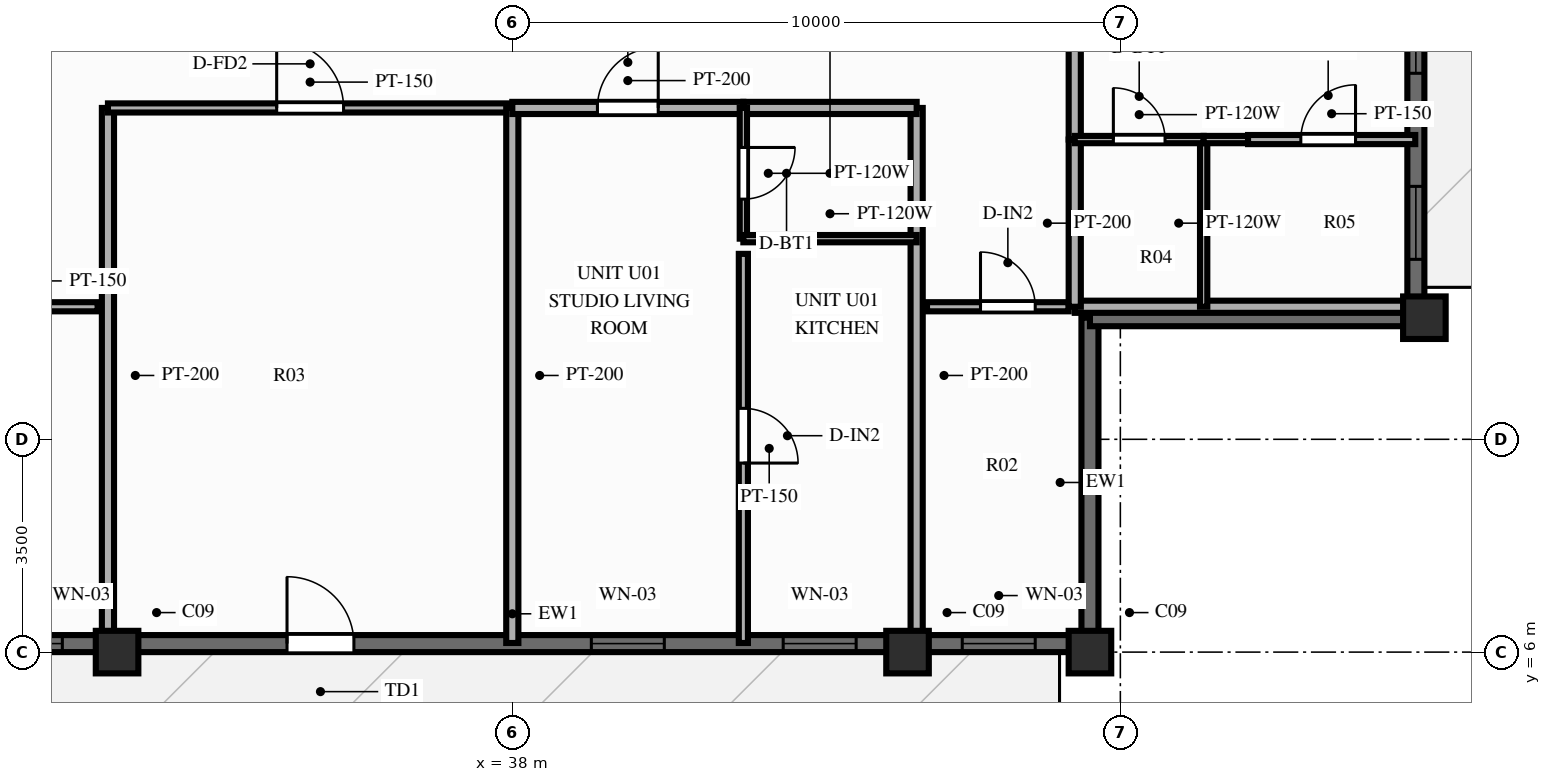
"""IFC4 building model, lengths in metres.
Left out: names, types, materials, properties, quantities, classifications, styles, units other than length and angle.
Written with IfcOpenShell. Run it as: python <this file> out.ifc"""

import sys

from ifc_helpers import new_model, si_unit, direction, frame, frame_2d, origin, origin_2d, place, context, subcontext, project, spatial, rectangle, extrude, source, transform, mapped, element, fill, save


model = new_model("IFC4")
c1 = context("Model", 3, precision=1e-05, world=origin(), true_north=direction((0.0, 1.0)))
c2 = subcontext(c1, "Body", "Model", "MODEL_VIEW")
j1 = project(units=[si_unit("LENGTHUNIT", "METRE"), si_unit("PLANEANGLEUNIT", "RADIAN")], contexts=[c1])
p1 = place(None, origin())
s1 = spatial("IfcSite", under=j1, at=p1, CompositionType="ELEMENT")
p2 = place(p1, origin())
s2 = spatial("IfcBuilding", under=s1, at=p2, CompositionType="ELEMENT")
p3 = place(p2, frame((0.0, 0.0, 243.0)))
s3 = spatial("IfcBuildingStorey", under=s2, at=p3, CompositionType="ELEMENT", Elevation=243.0)
m1 = source(origin(), c2, "Body", "SweptSolid", [
    extrude(rectangle(XDim=0.7, YDim=0.7, at=origin_2d()), origin(), (0.0, 0.0, 1.0), 3.0),
])
for number, where, z_axis, x_axis in (
    (1, (31.5, 6.0, 0.0), (0.0, 0.0, 1.0), (1.0, 0.0, 0.0)),
    (2, (44.5, 6.0, 0.0), (0.0, 0.0, 1.0), (1.0, 0.0, 0.0)),
    (3, (47.5, 6.0, 0.0), (0.0, 0.0, 1.0), (1.0, 0.0, 0.0)),
    (4, (53.0, 11.5, 0.0), (0.0, 0.0, 1.0), (1.0, 0.0, 0.0)),
):
    element("IfcColumn", number, at=place(p3, frame(where, z_axis=z_axis, x_axis=x_axis)), inside=s3, PredefinedType="COLUMN", context=c2, shape_type="MappedRepresentation", body=[
        mapped(m1, transform((0.0, 0.0, 0.0), scale=1.0)),
    ])
p4 = place(p3, frame((28.5, 6.14, 0.0), z_axis=(0.0, 0.0, 1.0), x_axis=(1.0, 0.0, 0.0)))
e5 = element("IfcWall", 5, at=p4, inside=s3, PredefinedType="SOLIDWALL", context=c2, shape_type="SweptSolid", body=[
    extrude(rectangle(XDim=19.0, YDim=0.28, at=frame_2d((9.5, 0.0))), origin(), (0.0, 0.0, 1.0), 2.28),
])
p5 = place(p4, frame((0.9, 0.0, 0.25)))
e6 = element("IfcOpeningElement", 6, at=p5, cuts=e5, PredefinedType="OPENING", context=c2, shape_type="SweptSolid", body=[
    extrude(rectangle(XDim=1.2, YDim=1.5, at=frame_2d((0.6, 0.75))), frame((0.0, 0.152, 0.0), z_axis=(0.0, -1.0, 0.0), x_axis=(1.0, 0.0, 0.0)), (0.0, 0.0, 1.0), 0.304),
])
p6 = place(p4, frame((6.895, 0.0, 0.0), z_axis=(0.0, 0.0, 1.0), x_axis=(-1.0, 0.0, 0.0)))
e7 = element("IfcOpeningElement", 7, at=p6, cuts=e5, PredefinedType="OPENING", context=c2, shape_type="SweptSolid", body=[
    extrude(rectangle(XDim=1.1, YDim=2.15, at=frame_2d((0.55, 1.075))), frame((0.0, 0.152, 0.0), z_axis=(0.0, -1.0, 0.0), x_axis=(1.0, 0.0, 0.0)), (0.0, 0.0, 1.0), 0.304),
])
p7 = place(p4, frame((10.8, 0.0, 0.25)))
e8 = element("IfcOpeningElement", 8, at=p7, cuts=e5, PredefinedType="OPENING", context=c2, shape_type="SweptSolid", body=[
    extrude(rectangle(XDim=1.2, YDim=1.5, at=frame_2d((0.6, 0.75))), frame((0.0, 0.152, 0.0), z_axis=(0.0, -1.0, 0.0), x_axis=(1.0, 0.0, 0.0)), (0.0, 0.0, 1.0), 0.304),
])
p8 = place(p4, frame((13.955, 0.0, 0.25)))
e9 = element("IfcOpeningElement", 9, at=p8, cuts=e5, PredefinedType="OPENING", context=c2, shape_type="SweptSolid", body=[
    extrude(rectangle(XDim=1.2, YDim=1.5, at=frame_2d((0.6, 0.75))), frame((0.0, 0.152, 0.0), z_axis=(0.0, -1.0, 0.0), x_axis=(1.0, 0.0, 0.0)), (0.0, 0.0, 1.0), 0.304),
])
p9 = place(p4, frame((16.9, 0.0, 0.25)))
e10 = element("IfcOpeningElement", 10, at=p9, cuts=e5, PredefinedType="OPENING", context=c2, shape_type="SweptSolid", body=[
    extrude(rectangle(XDim=1.2, YDim=1.5, at=frame_2d((0.6, 0.75))), frame((0.0, 0.152, 0.0), z_axis=(0.0, -1.0, 0.0), x_axis=(1.0, 0.0, 0.0)), (0.0, 0.0, 1.0), 0.304),
])
p10 = place(p3, frame((52.86, 11.5, 0.0), z_axis=(0.0, 0.0, 1.0), x_axis=(0.0, 1.0, 0.0)))
e11 = element("IfcWall", 11, at=p10, inside=s3, PredefinedType="SOLIDWALL", context=c2, shape_type="SweptSolid", body=[
    extrude(rectangle(XDim=31.0, YDim=0.28, at=frame_2d((15.5, 0.0))), origin(), (0.0, 0.0, 1.0), 2.28),
])
p11 = place(p10, frame((0.96, 0.0, 0.25)))
e12 = element("IfcOpeningElement", 12, at=p11, cuts=e11, PredefinedType="OPENING", context=c2, shape_type="SweptSolid", body=[
    extrude(rectangle(XDim=1.2, YDim=1.5, at=frame_2d((0.6, 0.75))), frame((0.0, 0.152, 0.0), z_axis=(0.0, -1.0, 0.0), x_axis=(1.0, 0.0, 0.0)), (0.0, 0.0, 1.0), 0.304),
])
p12 = place(p10, frame((4.02, 0.0, 0.25)))
e13 = element("IfcOpeningElement", 13, at=p12, cuts=e11, PredefinedType="OPENING", context=c2, shape_type="SweptSolid", body=[
    extrude(rectangle(XDim=1.2, YDim=1.5, at=frame_2d((0.6, 0.75))), frame((0.0, 0.152, 0.0), z_axis=(0.0, -1.0, 0.0), x_axis=(1.0, 0.0, 0.0)), (0.0, 0.0, 1.0), 0.304),
])
p13 = place(p10, frame((8.495, 0.0, 0.25)))
e14 = element("IfcOpeningElement", 14, at=p13, cuts=e11, PredefinedType="OPENING", context=c2, shape_type="SweptSolid", body=[
    extrude(rectangle(XDim=1.2, YDim=1.5, at=frame_2d((0.6, 0.75))), frame((0.0, 0.152, 0.0), z_axis=(0.0, -1.0, 0.0), x_axis=(1.0, 0.0, 0.0)), (0.0, 0.0, 1.0), 0.304),
])
p14 = place(p10, frame((12.9, 0.0, 0.25)))
e15 = element("IfcOpeningElement", 15, at=p14, cuts=e11, PredefinedType="OPENING", context=c2, shape_type="SweptSolid", body=[
    extrude(rectangle(XDim=1.2, YDim=1.5, at=frame_2d((0.6, 0.75))), frame((0.0, 0.152, 0.0), z_axis=(0.0, -1.0, 0.0), x_axis=(1.0, 0.0, 0.0)), (0.0, 0.0, 1.0), 0.304),
])
p15 = place(p10, frame((18.75, 0.0, 0.0), z_axis=(0.0, 0.0, 1.0), x_axis=(-1.0, 0.0, 0.0)))
e16 = element("IfcOpeningElement", 16, at=p15, cuts=e11, PredefinedType="OPENING", context=c2, shape_type="SweptSolid", body=[
    extrude(rectangle(XDim=1.6, YDim=2.15, at=frame_2d((0.8, 1.075))), frame((0.0, 0.152, 0.0), z_axis=(0.0, -1.0, 0.0), x_axis=(1.0, 0.0, 0.0)), (0.0, 0.0, 1.0), 0.304),
])
p16 = place(p10, frame((21.755, 0.0, 0.25)))
e17 = element("IfcOpeningElement", 17, at=p16, cuts=e11, PredefinedType="OPENING", context=c2, shape_type="SweptSolid", body=[
    extrude(rectangle(XDim=1.2, YDim=1.5, at=frame_2d((0.6, 0.75))), frame((0.0, 0.152, 0.0), z_axis=(0.0, -1.0, 0.0), x_axis=(1.0, 0.0, 0.0)), (0.0, 0.0, 1.0), 0.304),
])
p17 = place(p10, frame((27.15, 0.0, 0.25)))
e18 = element("IfcOpeningElement", 18, at=p17, cuts=e11, PredefinedType="OPENING", context=c2, shape_type="SweptSolid", body=[
    extrude(rectangle(XDim=1.2, YDim=1.5, at=frame_2d((0.6, 0.75))), frame((0.0, 0.152, 0.0), z_axis=(0.0, -1.0, 0.0), x_axis=(1.0, 0.0, 0.0)), (0.0, 0.0, 1.0), 0.304),
])
for number, where, z_axis, x_axis in (
    (19, (47.5, 6.08, 0.0), (0.0, 0.0, 1.0), (0.0, 1.0, 0.0)),
    (20, (47.5, 11.5, 0.0), (0.0, 0.0, 1.0), (1.0, 0.0, 0.0)),
):
    element("IfcWall", number, at=place(p3, frame(where, z_axis=z_axis, x_axis=x_axis)), inside=s3, PredefinedType="SOLIDWALL", context=c2, shape_type="SweptSolid", body=[
        extrude(rectangle(XDim=5.42, YDim=0.28, at=frame_2d((2.71, 0.0))), origin(), (0.0, 0.0, 1.0), 2.28),
    ])
p18 = place(p3, frame((28.85, 11.68, 0.0), z_axis=(0.0, 0.0, 1.0), x_axis=(1.0, 0.0, 0.0)))
e21 = element("IfcWall", 21, at=p18, inside=s3, PredefinedType="PARTITIONING", context=c2, shape_type="SweptSolid", body=[
    extrude(rectangle(XDim=2.33, YDim=0.15, at=frame_2d((1.165, 0.0))), origin(), (0.0, 0.0, 1.0), 2.79),
])
p19 = place(p18, frame((0.55, 0.0, 0.0)))
e22 = element("IfcOpeningElement", 22, at=p19, cuts=e21, PredefinedType="OPENING", context=c2, shape_type="SweptSolid", body=[
    extrude(rectangle(XDim=0.9, YDim=2.1, at=frame_2d((0.45, 1.05))), frame((0.0, 0.087, 0.0), z_axis=(0.0, -1.0, 0.0), x_axis=(1.0, 0.0, 0.0)), (0.0, 0.0, 1.0), 0.174),
])
p20 = place(p3, frame((44.82, 11.68, 0.0), z_axis=(0.0, 0.0, 1.0), x_axis=(1.0, 0.0, 0.0)))
e23 = element("IfcWall", 23, at=p20, inside=s3, PredefinedType="PARTITIONING", context=c2, shape_type="SweptSolid", body=[
    extrude(rectangle(XDim=2.33, YDim=0.15, at=frame_2d((1.165, 0.0))), origin(), (0.0, 0.0, 1.0), 2.79),
])
p21 = place(p20, frame((0.88, 0.0, 0.0)))
e24 = element("IfcOpeningElement", 24, at=p21, cuts=e23, PredefinedType="OPENING", context=c2, shape_type="SweptSolid", body=[
    extrude(rectangle(XDim=0.9, YDim=2.1, at=frame_2d((0.45, 1.05))), frame((0.0, 0.087, 0.0), z_axis=(0.0, -1.0, 0.0), x_axis=(1.0, 0.0, 0.0)), (0.0, 0.0, 1.0), 0.174),
])
for number, where, z_axis, x_axis in (
    (25, (31.35, 14.95, 0.0), (0.0, 0.0, 1.0), (0.0, -1.0, 0.0)),
    (26, (44.65, 14.95, 0.0), (0.0, 0.0, 1.0), (0.0, -1.0, 0.0)),
):
    element("IfcWall", number, at=place(p3, frame(where, z_axis=z_axis, x_axis=x_axis)), inside=s3, PredefinedType="PARTITIONING", context=c2, shape_type="SweptSolid", body=[
        extrude(rectangle(XDim=8.8, YDim=0.2, at=frame_2d((4.4, 0.0))), origin(), (0.0, 0.0, 1.0), 2.39),
    ])
p22 = place(p3, frame((31.35, 14.95, 0.0), z_axis=(0.0, 0.0, 1.0), x_axis=(1.0, 0.0, 0.0)))
e27 = element("IfcWall", 27, at=p22, inside=s3, PredefinedType="PARTITIONING", context=c2, shape_type="SweptSolid", body=[
    extrude(rectangle(XDim=6.65, YDim=0.15, at=frame_2d((3.325, 0.0))), origin(), (0.0, 0.0, 1.0), 2.79),
])
p23 = place(p22, frame((2.775, 0.0, 0.0)))
e28 = element("IfcOpeningElement", 28, at=p23, cuts=e27, PredefinedType="OPENING", context=c2, shape_type="SweptSolid", body=[
    extrude(rectangle(XDim=1.1, YDim=2.15, at=frame_2d((0.55, 1.075))), frame((0.0, 0.087, 0.0), z_axis=(0.0, -1.0, 0.0), x_axis=(1.0, 0.0, 0.0)), (0.0, 0.0, 1.0), 0.174),
])
p24 = place(p3, frame((38.0, 14.95, 0.0), z_axis=(0.0, 0.0, 1.0), x_axis=(0.0, -1.0, 0.0)))
e29 = element("IfcWall", 29, at=p24, inside=s3, PredefinedType="PARTITIONING", context=c2, shape_type="SweptSolid", body=[
    extrude(rectangle(XDim=8.8, YDim=0.2, at=frame_2d((4.4, 0.0))), origin(), (0.0, 0.0, 1.0), 2.79),
])
p25 = place(p3, frame((38.0, 14.95, 0.0), z_axis=(0.0, 0.0, 1.0), x_axis=(1.0, 0.0, 0.0)))
e30 = element("IfcWall", 30, at=p25, inside=s3, PredefinedType="PARTITIONING", context=c2, shape_type="SweptSolid", body=[
    extrude(rectangle(XDim=3.8, YDim=0.2, at=frame_2d((1.9, 0.0))), origin(), (0.0, 0.0, 1.0), 2.79),
])
p26 = place(p25, frame((1.4, 0.0, 0.0)))
e31 = element("IfcOpeningElement", 31, at=p26, cuts=e30, PredefinedType="OPENING", context=c2, shape_type="SweptSolid", body=[
    extrude(rectangle(XDim=1.0, YDim=2.15, at=frame_2d((0.5, 1.075))), frame((0.0, 0.112, 0.0), z_axis=(0.0, -1.0, 0.0), x_axis=(1.0, 0.0, 0.0)), (0.0, 0.0, 1.0), 0.224),
])
p27 = place(p3, frame((41.8, 14.95, 0.0), z_axis=(0.0, 0.0, 1.0), x_axis=(1.0, 0.0, 0.0)))
e32 = element("IfcWall", 32, at=p27, inside=s3, PredefinedType="PARTITIONING", context=c2, shape_type="SweptSolid", body=[
    extrude(rectangle(XDim=2.85, YDim=0.2, at=frame_2d((1.425, 0.0))), origin(), (0.0, 0.0, 1.0), 2.79),
])
p28 = place(p3, frame((41.8, 14.95, 0.0), z_axis=(0.0, 0.0, 1.0), x_axis=(0.0, -1.0, 0.0)))
e33 = element("IfcWall", 33, at=p28, inside=s3, PredefinedType="PARTITIONING", context=c2, shape_type="SweptSolid", body=[
    extrude(rectangle(XDim=2.15, YDim=0.12, at=frame_2d((1.075, 0.0))), origin(), (0.0, 0.0, 1.0), 2.79),
])
p29 = place(p28, frame((0.65, 0.0, 0.0)))
e34 = element("IfcOpeningElement", 34, at=p29, cuts=e33, PredefinedType="OPENING", context=c2, shape_type="SweptSolid", body=[
    extrude(rectangle(XDim=0.85, YDim=2.05, at=frame_2d((0.425, 1.025))), frame((0.0, 0.072, 0.0), z_axis=(0.0, -1.0, 0.0), x_axis=(1.0, 0.0, 0.0)), (0.0, 0.0, 1.0), 0.144),
])
p30 = place(p3, frame((41.8, 12.8, 0.0), z_axis=(0.0, 0.0, 1.0), x_axis=(1.0, 0.0, 0.0)))
e35 = element("IfcWall", 35, at=p30, inside=s3, PredefinedType="PARTITIONING", context=c2, shape_type="SweptSolid", body=[
    extrude(rectangle(XDim=2.85, YDim=0.12, at=frame_2d((1.425, 0.0))), origin(), (0.0, 0.0, 1.0), 2.79),
])
p31 = place(p3, frame((41.8, 12.55, 0.0), z_axis=(0.0, 0.0, 1.0), x_axis=(0.0, -1.0, 0.0)))
e36 = element("IfcWall", 36, at=p31, inside=s3, PredefinedType="PARTITIONING", context=c2, shape_type="SweptSolid", body=[
    extrude(rectangle(XDim=6.4, YDim=0.15, at=frame_2d((3.2, 0.0))), origin(), (0.0, 0.0, 1.0), 2.79),
])
p32 = place(p31, frame((2.541, 0.0, 0.0)))
e37 = element("IfcOpeningElement", 37, at=p32, cuts=e36, PredefinedType="OPENING", context=c2, shape_type="SweptSolid", body=[
    extrude(rectangle(XDim=0.9, YDim=2.1, at=frame_2d((0.45, 1.05))), frame((0.0, 0.087, 0.0), z_axis=(0.0, -1.0, 0.0), x_axis=(1.0, 0.0, 0.0)), (0.0, 0.0, 1.0), 0.174),
])
p33 = place(p3, frame((47.25, 11.68, 0.0), z_axis=(0.0, 0.0, 1.0), x_axis=(1.0, 0.0, 0.0)))
e38 = element("IfcWall", 38, at=p33, inside=s3, PredefinedType="PARTITIONING", context=c2, shape_type="SweptSolid", body=[
    extrude(rectangle(XDim=5.6, YDim=0.2, at=frame_2d((2.8, 0.0))), origin(), (0.0, 0.0, 1.0), 2.79),
])
p34 = place(p3, frame((47.25, 11.68, 0.0), z_axis=(0.0, 0.0, 1.0), x_axis=(0.0, 1.0, 0.0)))
e39 = element("IfcWall", 39, at=p34, inside=s3, PredefinedType="PARTITIONING", context=c2, shape_type="SweptSolid", body=[
    extrude(rectangle(XDim=2.75, YDim=0.2, at=frame_2d((1.375, 0.0))), origin(), (0.0, 0.0, 1.0), 2.79),
])
p35 = place(p3, frame((47.25, 14.43, 0.0), z_axis=(0.0, 0.0, 1.0), x_axis=(0.0, 1.0, 0.0)))
e40 = element("IfcWall", 40, at=p35, inside=s3, PredefinedType="PARTITIONING", context=c2, shape_type="SweptSolid", body=[
    extrude(rectangle(XDim=8.57, YDim=0.2, at=frame_2d((4.285, 0.0))), origin(), (0.0, 0.0, 1.0), 2.79),
])
p36 = place(p35, frame((3.785, 0.0, 0.0)))
e41 = element("IfcOpeningElement", 41, at=p36, cuts=e40, PredefinedType="OPENING", context=c2, shape_type="SweptSolid", body=[
    extrude(rectangle(XDim=1.0, YDim=2.15, at=frame_2d((0.5, 1.075))), frame((0.0, 0.112, 0.0), z_axis=(0.0, -1.0, 0.0), x_axis=(1.0, 0.0, 0.0)), (0.0, 0.0, 1.0), 0.224),
])
p37 = place(p3, frame((49.37, 11.68, 0.0), z_axis=(0.0, 0.0, 1.0), x_axis=(0.0, 1.0, 0.0)))
e42 = element("IfcWall", 42, at=p37, inside=s3, PredefinedType="PARTITIONING", context=c2, shape_type="SweptSolid", body=[
    extrude(rectangle(XDim=2.75, YDim=0.12, at=frame_2d((1.375, 0.0))), origin(), (0.0, 0.0, 1.0), 2.79),
])
p38 = place(p3, frame((47.25, 14.43, 0.0), z_axis=(0.0, 0.0, 1.0), x_axis=(1.0, 0.0, 0.0)))
e43 = element("IfcWall", 43, at=p38, inside=s3, PredefinedType="PARTITIONING", context=c2, shape_type="SweptSolid", body=[
    extrude(rectangle(XDim=2.12, YDim=0.12, at=frame_2d((1.06, 0.0))), origin(), (0.0, 0.0, 1.0), 2.79),
])
p39 = place(p38, frame((0.635, 0.0, 0.0)))
e44 = element("IfcOpeningElement", 44, at=p39, cuts=e43, PredefinedType="OPENING", context=c2, shape_type="SweptSolid", body=[
    extrude(rectangle(XDim=0.85, YDim=2.05, at=frame_2d((0.425, 1.025))), frame((0.0, 0.072, 0.0), z_axis=(0.0, -1.0, 0.0), x_axis=(1.0, 0.0, 0.0)), (0.0, 0.0, 1.0), 0.144),
])
p40 = place(p3, frame((49.37, 14.43, 0.0), z_axis=(0.0, 0.0, 1.0), x_axis=(1.0, 0.0, 0.0)))
e45 = element("IfcWall", 45, at=p40, inside=s3, PredefinedType="PARTITIONING", context=c2, shape_type="SweptSolid", body=[
    extrude(rectangle(XDim=0.73, YDim=0.12, at=frame_2d((0.365, 0.0))), origin(), (0.0, 0.0, 1.0), 2.79),
])
p41 = place(p3, frame((50.1, 14.43, 0.0), z_axis=(0.0, 0.0, 1.0), x_axis=(1.0, 0.0, 0.0)))
e46 = element("IfcWall", 46, at=p41, inside=s3, PredefinedType="PARTITIONING", context=c2, shape_type="SweptSolid", body=[
    extrude(rectangle(XDim=2.75, YDim=0.15, at=frame_2d((1.375, 0.0))), origin(), (0.0, 0.0, 1.0), 2.79),
])
p42 = place(p41, frame((0.868, 0.0, 0.0)))
e47 = element("IfcOpeningElement", 47, at=p42, cuts=e46, PredefinedType="OPENING", context=c2, shape_type="SweptSolid", body=[
    extrude(rectangle(XDim=0.9, YDim=2.1, at=frame_2d((0.45, 1.05))), frame((0.0, 0.087, 0.0), z_axis=(0.0, -1.0, 0.0), x_axis=(1.0, 0.0, 0.0)), (0.0, 0.0, 1.0), 0.174),
])
m2 = source(origin(), c2, "Body", "SweptSolid", [
    extrude(rectangle(XDim=1.2, YDim=1.5, at=frame_2d((0.6, 0.75))), frame((0.0, 0.03, 0.0), z_axis=(0.0, -1.0, 0.0), x_axis=(1.0, 0.0, 0.0)), (0.0, 0.0, 1.0), 0.06),
])
p43 = place(p5, origin())
e48 = element("IfcWindow", 48, at=p43, inside=s3, PartitioningType="SINGLE_PANEL", PredefinedType="WINDOW", context=c2, shape_type="MappedRepresentation", body=[
    mapped(m2, transform((0.0, 0.0, 0.0), scale=1.0)),
])
fill(e6, e48)
m3 = source(origin(), c2, "Body", "SweptSolid", [
    extrude(rectangle(XDim=1.1, YDim=2.15, at=frame_2d((0.55, 1.075))), frame((0.0, 0.025, 0.0), z_axis=(0.0, -1.0, 0.0), x_axis=(1.0, 0.0, 0.0)), (0.0, 0.0, 1.0), 0.05),
])
p44 = place(p6, origin())
e49 = element("IfcDoor", 49, at=p44, inside=s3, OperationType="SINGLE_SWING_RIGHT", PredefinedType="DOOR", context=c2, shape_type="MappedRepresentation", body=[
    mapped(m3, transform((0.0, 0.0, 0.0), scale=1.0)),
])
fill(e7, e49)
p45 = place(p7, origin())
e50 = element("IfcWindow", 50, at=p45, inside=s3, PartitioningType="SINGLE_PANEL", PredefinedType="WINDOW", context=c2, shape_type="MappedRepresentation", body=[
    mapped(m2, transform((0.0, 0.0, 0.0), scale=1.0)),
])
fill(e8, e50)
p46 = place(p8, origin())
e51 = element("IfcWindow", 51, at=p46, inside=s3, PartitioningType="SINGLE_PANEL", PredefinedType="WINDOW", context=c2, shape_type="MappedRepresentation", body=[
    mapped(m2, transform((0.0, 0.0, 0.0), scale=1.0)),
])
fill(e9, e51)
p47 = place(p9, origin())
e52 = element("IfcWindow", 52, at=p47, inside=s3, PartitioningType="SINGLE_PANEL", PredefinedType="WINDOW", context=c2, shape_type="MappedRepresentation", body=[
    mapped(m2, transform((0.0, 0.0, 0.0), scale=1.0)),
])
fill(e10, e52)
p48 = place(p11, origin())
e53 = element("IfcWindow", 53, at=p48, inside=s3, PartitioningType="SINGLE_PANEL", PredefinedType="WINDOW", context=c2, shape_type="MappedRepresentation", body=[
    mapped(m2, transform((0.0, 0.0, 0.0), scale=1.0)),
])
fill(e12, e53)
p49 = place(p12, origin())
e54 = element("IfcWindow", 54, at=p49, inside=s3, PartitioningType="SINGLE_PANEL", PredefinedType="WINDOW", context=c2, shape_type="MappedRepresentation", body=[
    mapped(m2, transform((0.0, 0.0, 0.0), scale=1.0)),
])
fill(e13, e54)
m4 = source(origin(), c2, "Body", "SweptSolid", [
    extrude(rectangle(XDim=0.9, YDim=2.1, at=frame_2d((0.45, 1.05))), frame((0.0, 0.025, 0.0), z_axis=(0.0, -1.0, 0.0), x_axis=(1.0, 0.0, 0.0)), (0.0, 0.0, 1.0), 0.05),
])
p50 = place(p21, origin())
e55 = element("IfcDoor", 55, at=p50, inside=s3, OperationType="SINGLE_SWING_LEFT", PredefinedType="DOOR", context=c2, shape_type="MappedRepresentation", body=[
    mapped(m4, transform((0.0, 0.0, 0.0), scale=1.0)),
])
fill(e24, e55)
p51 = place(p23, origin())
e56 = element("IfcDoor", 56, at=p51, inside=s3, OperationType="SINGLE_SWING_LEFT", PredefinedType="DOOR", context=c2, shape_type="MappedRepresentation", body=[
    mapped(m3, transform((0.0, 0.0, 0.0), scale=1.0)),
])
fill(e28, e56)
m5 = source(origin(), c2, "Body", "SweptSolid", [
    extrude(rectangle(XDim=1.0, YDim=2.15, at=frame_2d((0.5, 1.075))), frame((0.0, 0.025, 0.0), z_axis=(0.0, -1.0, 0.0), x_axis=(1.0, 0.0, 0.0)), (0.0, 0.0, 1.0), 0.05),
])
p52 = place(p26, origin())
e57 = element("IfcDoor", 57, at=p52, inside=s3, OperationType="SINGLE_SWING_RIGHT", PredefinedType="DOOR", context=c2, shape_type="MappedRepresentation", body=[
    mapped(m5, transform((0.0, 0.0, 0.0), scale=1.0)),
])
fill(e31, e57)
m6 = source(origin(), c2, "Body", "SweptSolid", [
    extrude(rectangle(XDim=0.85, YDim=2.05, at=frame_2d((0.425, 1.025))), frame((0.0, 0.025, 0.0), z_axis=(0.0, -1.0, 0.0), x_axis=(1.0, 0.0, 0.0)), (0.0, 0.0, 1.0), 0.05),
])
p53 = place(p29, origin())
e58 = element("IfcDoor", 58, at=p53, inside=s3, OperationType="SINGLE_SWING_LEFT", PredefinedType="DOOR", context=c2, shape_type="MappedRepresentation", body=[
    mapped(m6, transform((0.0, 0.0, 0.0), scale=1.0)),
])
fill(e34, e58)
p54 = place(p32, origin())
e59 = element("IfcDoor", 59, at=p54, inside=s3, OperationType="SINGLE_SWING_RIGHT", PredefinedType="DOOR", context=c2, shape_type="MappedRepresentation", body=[
    mapped(m4, transform((0.0, 0.0, 0.0), scale=1.0)),
])
fill(e37, e59)
p55 = place(p39, origin())
e60 = element("IfcDoor", 60, at=p55, inside=s3, OperationType="SINGLE_SWING_LEFT", PredefinedType="DOOR", context=c2, shape_type="MappedRepresentation", body=[
    mapped(m6, transform((0.0, 0.0, 0.0), scale=1.0)),
])
fill(e44, e60)
p56 = place(p42, origin())
e61 = element("IfcDoor", 61, at=p56, inside=s3, OperationType="SINGLE_SWING_RIGHT", PredefinedType="DOOR", context=c2, shape_type="MappedRepresentation", body=[
    mapped(m4, transform((0.0, 0.0, 0.0), scale=1.0)),
])
fill(e47, e61)
save(model, sys.argv[1])
